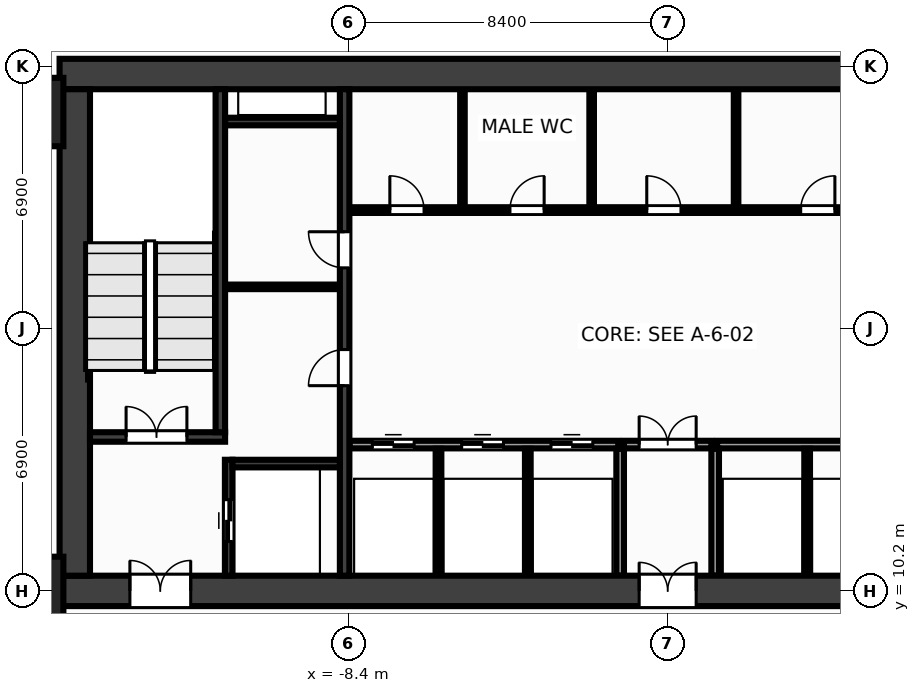
"""IFC4 building model, lengths in metres.
Left out: names, types, materials, properties, quantities, classifications, styles, units other than length and angle.
Written with IfcOpenShell. Run it as: python <this file> out.ifc"""

import sys

from ifc_helpers import new_model, si_unit, direction, frame, frame_2d, origin, origin_2d, place, context, subcontext, project, spatial, rectangle, extrude, source, transform, mapped, element, fill, save


model = new_model("IFC4")
c1 = context("Model", 3, precision=1e-05, world=origin(), true_north=direction((0.0, 1.0)))
c2 = subcontext(c1, "Body", "Model", "MODEL_VIEW")
j1 = project(units=[si_unit("LENGTHUNIT", "METRE"), si_unit("PLANEANGLEUNIT", "RADIAN")], contexts=[c1])
p1 = place(None, origin())
s1 = spatial("IfcSite", under=j1, at=p1, CompositionType="ELEMENT")
p2 = place(p1, origin())
s2 = spatial("IfcBuilding", under=s1, at=p2, CompositionType="ELEMENT")
p3 = place(p2, frame((0.0, 0.0, 9.65)))
s3 = spatial("IfcBuildingStorey", under=s2, at=p3, CompositionType="ELEMENT", Elevation=9.65)
m1 = source(origin(), c2, "Body", "SweptSolid", [
    extrude(rectangle(XDim=32.0, YDim=0.8, at=frame_2d((16.0, 0.0))), origin(), (0.0, 0.0, 1.0), 4.65),
])
p4 = place(p3, frame((-16.0, 23.8, 0.0), z_axis=(0.0, 0.0, 1.0), x_axis=(1.0, 0.0, 0.0)))
e1 = element("IfcWall", 1, at=p4, inside=s3, PredefinedType="SHEAR", context=c2, shape_type="MappedRepresentation", body=[
    mapped(m1, transform((0.0, 0.0, 0.0), x_axis=(1.0, 0.0, 0.0), y_axis=(0.0, 1.0, 0.0), z_axis=(0.0, 0.0, 1.0), scale=1.0)),
])
p5 = place(p3, frame((-16.0, 10.2, 0.0), z_axis=(0.0, 0.0, 1.0), x_axis=(1.0, 0.0, 0.0)))
e2 = element("IfcWall", 2, at=p5, inside=s3, PredefinedType="SHEAR", context=c2, shape_type="MappedRepresentation", body=[
    mapped(m1, transform((0.0, 0.0, 0.0), x_axis=(1.0, 0.0, 0.0), y_axis=(0.0, 1.0, 0.0), z_axis=(0.0, 0.0, 1.0), scale=1.0)),
])
p6 = place(p5, frame((1.85, 0.0, 0.0)))
e3 = element("IfcOpeningElement", 3, at=p6, cuts=e2, PredefinedType="OPENING", context=c2, shape_type="SweptSolid", body=[
    extrude(rectangle(XDim=1.6, YDim=2.15, at=frame_2d((0.8, 1.075))), frame((0.0, 0.412, 0.0), z_axis=(0.0, -1.0, 0.0), x_axis=(1.0, 0.0, 0.0)), (0.0, 0.0, 1.0), 0.824),
])
p7 = place(p5, frame((28.55, 0.0, 0.0)))
e4 = element("IfcOpeningElement", 4, at=p7, cuts=e2, PredefinedType="OPENING", context=c2, shape_type="SweptSolid", body=[
    extrude(rectangle(XDim=1.6, YDim=2.15, at=frame_2d((0.8, 1.075))), frame((0.0, 0.412, 0.0), z_axis=(0.0, -1.0, 0.0), x_axis=(1.0, 0.0, 0.0)), (0.0, 0.0, 1.0), 0.824),
])
p8 = place(p5, frame((15.25, 0.0, 0.0)))
e5 = element("IfcOpeningElement", 5, at=p8, cuts=e2, PredefinedType="OPENING", context=c2, shape_type="SweptSolid", body=[
    extrude(rectangle(XDim=1.5, YDim=2.2, at=frame_2d((0.75, 1.1))), frame((0.0, 0.412, 0.0), z_axis=(0.0, -1.0, 0.0), x_axis=(1.0, 0.0, 0.0)), (0.0, 0.0, 1.0), 0.824),
])
m2 = source(origin(), c2, "Body", "SweptSolid", [
    extrude(rectangle(XDim=12.8, YDim=0.8, at=frame_2d((6.4, 0.0))), origin(), (0.0, 0.0, 1.0), 4.65),
])
p9 = place(p3, frame((-15.6, 10.6, 0.0), z_axis=(0.0, 0.0, 1.0), x_axis=(0.0, 1.0, 0.0)))
e6 = element("IfcWall", 6, at=p9, inside=s3, PredefinedType="SHEAR", context=c2, shape_type="MappedRepresentation", body=[
    mapped(m2, transform((0.0, 0.0, 0.0), x_axis=(1.0, 0.0, 0.0), y_axis=(0.0, 1.0, 0.0), z_axis=(0.0, 0.0, 1.0), scale=1.0)),
])
m3 = source(origin(), c2, "Body", "SweptSolid", [
    extrude(rectangle(XDim=12.8, YDim=0.25, at=frame_2d((6.4, 0.0))), origin(), (0.0, 0.0, 1.0), 4.65),
])
p10 = place(p3, frame((-8.5, 10.6, 0.0), z_axis=(0.0, 0.0, 1.0), x_axis=(0.0, 1.0, 0.0)))
e7 = element("IfcWall", 7, at=p10, inside=s3, PredefinedType="SHEAR", context=c2, shape_type="MappedRepresentation", body=[
    mapped(m3, transform((0.0, 0.0, 0.0), x_axis=(1.0, 0.0, 0.0), y_axis=(0.0, 1.0, 0.0), z_axis=(0.0, 0.0, 1.0), scale=1.0)),
])
p11 = place(p10, frame((5.0, 0.0, 0.0)))
e8 = element("IfcOpeningElement", 8, at=p11, cuts=e7, PredefinedType="OPENING", context=c2, shape_type="SweptSolid", body=[
    extrude(rectangle(XDim=0.95, YDim=2.15, at=frame_2d((0.475, 1.075))), frame((0.0, 0.137, 0.0), z_axis=(0.0, -1.0, 0.0), x_axis=(1.0, 0.0, 0.0)), (0.0, 0.0, 1.0), 0.274),
])
p12 = place(p10, frame((8.1, 0.0, 0.0)))
e9 = element("IfcOpeningElement", 9, at=p12, cuts=e7, PredefinedType="OPENING", context=c2, shape_type="SweptSolid", body=[
    extrude(rectangle(XDim=0.95, YDim=2.15, at=frame_2d((0.475, 1.075))), frame((0.0, 0.137, 0.0), z_axis=(0.0, -1.0, 0.0), x_axis=(1.0, 0.0, 0.0)), (0.0, 0.0, 1.0), 0.274),
])
m4 = source(origin(), c2, "Body", "SweptSolid", [
    extrude(rectangle(XDim=3.555, YDim=0.25, at=frame_2d((1.777, 0.0))), origin(), (0.0, 0.0, 1.0), 4.65),
])
p13 = place(p3, frame((-15.2, 14.25, 0.0), z_axis=(0.0, 0.0, 1.0), x_axis=(1.0, 0.0, 0.0)))
e10 = element("IfcWall", 10, at=p13, inside=s3, PredefinedType="SHEAR", context=c2, shape_type="MappedRepresentation", body=[
    mapped(m4, transform((0.0, 0.0, 0.0), x_axis=(1.0, 0.0, 0.0), y_axis=(0.0, 1.0, 0.0), z_axis=(0.0, 0.0, 1.0), scale=1.0)),
])
p14 = place(p13, frame((0.95, 0.0, 0.0)))
e11 = element("IfcOpeningElement", 11, at=p14, cuts=e10, PredefinedType="OPENING", context=c2, shape_type="SweptSolid", body=[
    extrude(rectangle(XDim=1.6, YDim=2.15, at=frame_2d((0.8, 1.075))), frame((0.0, 0.137, 0.0), z_axis=(0.0, -1.0, 0.0), x_axis=(1.0, 0.0, 0.0)), (0.0, 0.0, 1.0), 0.274),
])
m5 = source(origin(), c2, "Body", "SweptSolid", [
    extrude(rectangle(XDim=9.025, YDim=0.25, at=frame_2d((4.512, 0.0))), origin(), (0.0, 0.0, 1.0), 4.65),
])
p15 = place(p3, frame((-11.77, 14.375, 0.0), z_axis=(0.0, 0.0, 1.0), x_axis=(0.0, 1.0, 0.0)))
e12 = element("IfcWall", 12, at=p15, inside=s3, PredefinedType="SHEAR", context=c2, shape_type="MappedRepresentation", body=[
    mapped(m5, transform((0.0, 0.0, 0.0), x_axis=(1.0, 0.0, 0.0), y_axis=(0.0, 1.0, 0.0), z_axis=(0.0, 0.0, 1.0), scale=1.0)),
])
m6 = source(origin(), c2, "Body", "SweptSolid", [
    extrude(rectangle(XDim=3.05, YDim=0.2, at=frame_2d((1.525, 0.0))), origin(), (0.0, 0.0, 1.0), 4.65),
])
p16 = place(p3, frame((-11.55, 10.6, 0.0), z_axis=(0.0, 0.0, 1.0), x_axis=(0.0, 1.0, 0.0)))
e13 = element("IfcWall", 13, at=p16, inside=s3, PredefinedType="SHEAR", context=c2, shape_type="MappedRepresentation", body=[
    mapped(m6, transform((0.0, 0.0, 0.0), x_axis=(1.0, 0.0, 0.0), y_axis=(0.0, 1.0, 0.0), z_axis=(0.0, 0.0, 1.0), scale=1.0)),
])
p17 = place(p16, frame((0.9, 0.0, 0.0)))
e14 = element("IfcOpeningElement", 14, at=p17, cuts=e13, PredefinedType="OPENING", context=c2, shape_type="SweptSolid", body=[
    extrude(rectangle(XDim=1.1, YDim=2.15, at=frame_2d((0.55, 1.075))), frame((0.0, 0.112, 0.0), z_axis=(0.0, -1.0, 0.0), x_axis=(1.0, 0.0, 0.0)), (0.0, 0.0, 1.0), 0.224),
])
m7 = source(origin(), c2, "Body", "SweptSolid", [
    extrude(rectangle(XDim=2.825, YDim=0.2, at=frame_2d((1.413, 0.0))), origin(), (0.0, 0.0, 1.0), 4.65),
])
p18 = place(p3, frame((-11.45, 13.55, 0.0), z_axis=(0.0, 0.0, 1.0), x_axis=(1.0, 0.0, 0.0)))
e15 = element("IfcWall", 15, at=p18, inside=s3, PredefinedType="SHEAR", context=c2, shape_type="MappedRepresentation", body=[
    mapped(m7, transform((0.0, 0.0, 0.0), x_axis=(1.0, 0.0, 0.0), y_axis=(0.0, 1.0, 0.0), z_axis=(0.0, 0.0, 1.0), scale=1.0)),
])
m8 = source(origin(), c2, "Body", "SweptSolid", [
    extrude(rectangle(XDim=3.02, YDim=0.2, at=frame_2d((1.51, 0.0))), origin(), (0.0, 0.0, 1.0), 4.65),
])
p19 = place(p3, frame((-11.645, 22.55, 0.0), z_axis=(0.0, 0.0, 1.0), x_axis=(1.0, 0.0, 0.0)))
e16 = element("IfcWall", 16, at=p19, inside=s3, PredefinedType="SHEAR", context=c2, shape_type="MappedRepresentation", body=[
    mapped(m8, transform((0.0, 0.0, 0.0), x_axis=(1.0, 0.0, 0.0), y_axis=(0.0, 1.0, 0.0), z_axis=(0.0, 0.0, 1.0), scale=1.0)),
])
m9 = source(origin(), c2, "Body", "SweptSolid", [
    extrude(rectangle(XDim=1.8, YDim=1.8, at=origin_2d()), origin(), (0.0, 0.0, 1.0), 4.65),
])
for number, where, z_axis, x_axis in (
    (17, (-16.8, 10.2, 0.0), (0.0, 0.0, 1.0), (1.0, 0.0, 0.0)),
    (18, (-16.8, 22.8, 0.0), (0.0, 0.0, 1.0), (1.0, 0.0, 0.0)),
):
    element("IfcColumn", number, at=place(p3, frame(where, z_axis=z_axis, x_axis=x_axis)), inside=s3, PredefinedType="COLUMN", context=c2, shape_type="MappedRepresentation", body=[
        mapped(m9, transform((0.0, 0.0, 0.0), x_axis=(1.0, 0.0, 0.0), y_axis=(0.0, 1.0, 0.0), z_axis=(0.0, 0.0, 1.0), scale=1.0)),
    ])
m10 = source(origin(), c2, "Body", "SweptSolid", [
    extrude(rectangle(XDim=3.01, YDim=0.12, at=frame_2d((1.505, 0.0))), origin(), (0.0, 0.0, 1.0), 4.37),
])
p20 = place(p3, frame((-11.64, 18.2, 0.0), z_axis=(0.0, 0.0, 1.0), x_axis=(1.0, 0.0, 0.0)))
e19 = element("IfcWall", 19, at=p20, inside=s3, PredefinedType="PARTITIONING", context=c2, shape_type="MappedRepresentation", body=[
    mapped(m10, transform((0.0, 0.0, 0.0), x_axis=(1.0, 0.0, 0.0), y_axis=(0.0, 1.0, 0.0), z_axis=(0.0, 0.0, 1.0), scale=1.0)),
])
m11 = source(origin(), c2, "Body", "SweptSolid", [
    extrude(rectangle(XDim=7.07, YDim=0.2, at=frame_2d((3.535, 0.0))), origin(), (0.0, 0.0, 1.0), 4.37),
])
p21 = place(p3, frame((-8.37, 14.05, 0.0), z_axis=(0.0, 0.0, 1.0), x_axis=(1.0, 0.0, 0.0)))
e20 = element("IfcWall", 20, at=p21, inside=s3, PredefinedType="PARTITIONING", context=c2, shape_type="MappedRepresentation", body=[
    mapped(m11, transform((0.0, 0.0, 0.0), x_axis=(1.0, 0.0, 0.0), y_axis=(0.0, 1.0, 0.0), z_axis=(0.0, 0.0, 1.0), scale=1.0)),
])
p22 = place(p21, frame((0.6, 0.0, 0.0)))
e21 = element("IfcOpeningElement", 21, at=p22, cuts=e20, PredefinedType="OPENING", context=c2, shape_type="SweptSolid", body=[
    extrude(rectangle(XDim=1.1, YDim=2.15, at=frame_2d((0.55, 1.075))), frame((0.0, 0.112, 0.0), z_axis=(0.0, -1.0, 0.0), x_axis=(1.0, 0.0, 0.0)), (0.0, 0.0, 1.0), 0.224),
])
p23 = place(p21, frame((2.95, 0.0, 0.0)))
e22 = element("IfcOpeningElement", 22, at=p23, cuts=e20, PredefinedType="OPENING", context=c2, shape_type="SweptSolid", body=[
    extrude(rectangle(XDim=1.1, YDim=2.15, at=frame_2d((0.55, 1.075))), frame((0.0, 0.112, 0.0), z_axis=(0.0, -1.0, 0.0), x_axis=(1.0, 0.0, 0.0)), (0.0, 0.0, 1.0), 0.224),
])
p24 = place(p21, frame((5.3, 0.0, 0.0)))
e23 = element("IfcOpeningElement", 23, at=p24, cuts=e20, PredefinedType="OPENING", context=c2, shape_type="SweptSolid", body=[
    extrude(rectangle(XDim=1.1, YDim=2.15, at=frame_2d((0.55, 1.075))), frame((0.0, 0.112, 0.0), z_axis=(0.0, -1.0, 0.0), x_axis=(1.0, 0.0, 0.0)), (0.0, 0.0, 1.0), 0.224),
])
p25 = place(p3, frame((1.3, 14.05, 0.0), z_axis=(0.0, 0.0, 1.0), x_axis=(1.0, 0.0, 0.0)))
e24 = element("IfcWall", 24, at=p25, inside=s3, PredefinedType="PARTITIONING", context=c2, shape_type="MappedRepresentation", body=[
    mapped(m11, transform((0.0, 0.0, 0.0), x_axis=(1.0, 0.0, 0.0), y_axis=(0.0, 1.0, 0.0), z_axis=(0.0, 0.0, 1.0), scale=1.0)),
])
m12 = source(origin(), c2, "Body", "SweptSolid", [
    extrude(rectangle(XDim=3.34, YDim=0.2, at=frame_2d((1.67, 0.0))), origin(), (0.0, 0.0, 1.0), 4.37),
])
for number, where, z_axis, x_axis in (
    (25, (-1.25, 10.6, 0.0), (0.0, 0.0, 1.0), (0.0, 1.0, 0.0)),
    (26, (1.25, 10.6, 0.0), (0.0, 0.0, 1.0), (0.0, 1.0, 0.0)),
):
    element("IfcWall", number, at=place(p3, frame(where, z_axis=z_axis, x_axis=x_axis)), inside=s3, PredefinedType="PARTITIONING", context=c2, shape_type="MappedRepresentation", body=[
        mapped(m12, transform((0.0, 0.0, 0.0), x_axis=(1.0, 0.0, 0.0), y_axis=(0.0, 1.0, 0.0), z_axis=(0.0, 0.0, 1.0), scale=1.0)),
    ])
m13 = source(origin(), c2, "Body", "SweptSolid", [
    extrude(rectangle(XDim=2.3, YDim=0.2, at=frame_2d((1.15, 0.0))), origin(), (0.0, 0.0, 1.0), 4.37),
])
p26 = place(p3, frame((-1.15, 14.05, 0.0), z_axis=(0.0, 0.0, 1.0), x_axis=(1.0, 0.0, 0.0)))
e27 = element("IfcWall", 27, at=p26, inside=s3, PredefinedType="PARTITIONING", context=c2, shape_type="MappedRepresentation", body=[
    mapped(m13, transform((0.0, 0.0, 0.0), x_axis=(1.0, 0.0, 0.0), y_axis=(0.0, 1.0, 0.0), z_axis=(0.0, 0.0, 1.0), scale=1.0)),
])
p27 = place(p26, frame((0.4, 0.0, 0.0)))
e28 = element("IfcOpeningElement", 28, at=p27, cuts=e27, PredefinedType="OPENING", context=c2, shape_type="SweptSolid", body=[
    extrude(rectangle(XDim=1.5, YDim=2.2, at=frame_2d((0.75, 1.1))), frame((0.0, 0.112, 0.0), z_axis=(0.0, -1.0, 0.0), x_axis=(1.0, 0.0, 0.0)), (0.0, 0.0, 1.0), 0.224),
])
m14 = source(origin(), c2, "Body", "SweptSolid", [
    extrude(rectangle(XDim=14.59, YDim=0.15, at=frame_2d((7.295, 0.0))), origin(), (0.0, 0.0, 1.0), 4.37),
])
p28 = place(p3, frame((-8.37, 20.22, 0.0), z_axis=(0.0, 0.0, 1.0), x_axis=(1.0, 0.0, 0.0)))
e29 = element("IfcWall", 29, at=p28, inside=s3, PredefinedType="PARTITIONING", context=c2, shape_type="MappedRepresentation", body=[
    mapped(m14, transform((0.0, 0.0, 0.0), x_axis=(1.0, 0.0, 0.0), y_axis=(0.0, 1.0, 0.0), z_axis=(0.0, 0.0, 1.0), scale=1.0)),
])
p29 = place(p28, frame((1.06, 0.0, 0.0)))
e30 = element("IfcOpeningElement", 30, at=p29, cuts=e29, PredefinedType="OPENING", context=c2, shape_type="SweptSolid", body=[
    extrude(rectangle(XDim=0.9, YDim=2.15, at=frame_2d((0.45, 1.075))), frame((0.0, 0.087, 0.0), z_axis=(0.0, -1.0, 0.0), x_axis=(1.0, 0.0, 0.0)), (0.0, 0.0, 1.0), 0.174),
])
p30 = place(p28, frame((4.22, 0.0, 0.0)))
e31 = element("IfcOpeningElement", 31, at=p30, cuts=e29, PredefinedType="OPENING", context=c2, shape_type="SweptSolid", body=[
    extrude(rectangle(XDim=0.9, YDim=2.15, at=frame_2d((0.45, 1.075))), frame((0.0, 0.087, 0.0), z_axis=(0.0, -1.0, 0.0), x_axis=(1.0, 0.0, 0.0)), (0.0, 0.0, 1.0), 0.174),
])
p31 = place(p28, frame((7.82, 0.0, 0.0)))
e32 = element("IfcOpeningElement", 32, at=p31, cuts=e29, PredefinedType="OPENING", context=c2, shape_type="SweptSolid", body=[
    extrude(rectangle(XDim=0.9, YDim=2.15, at=frame_2d((0.45, 1.075))), frame((0.0, 0.087, 0.0), z_axis=(0.0, -1.0, 0.0), x_axis=(1.0, 0.0, 0.0)), (0.0, 0.0, 1.0), 0.174),
])
p32 = place(p28, frame((11.87, 0.0, 0.0)))
e33 = element("IfcOpeningElement", 33, at=p32, cuts=e29, PredefinedType="OPENING", context=c2, shape_type="SweptSolid", body=[
    extrude(rectangle(XDim=0.9, YDim=2.15, at=frame_2d((0.45, 1.075))), frame((0.0, 0.087, 0.0), z_axis=(0.0, -1.0, 0.0), x_axis=(1.0, 0.0, 0.0)), (0.0, 0.0, 1.0), 0.174),
])
m15 = source(origin(), c2, "Body", "SweptSolid", [
    extrude(rectangle(XDim=3.34, YDim=0.15, at=frame_2d((1.67, 0.0))), origin(), (0.0, 0.0, 1.0), 4.37),
])
for number, where, z_axis, x_axis in (
    (34, (-6.03, 10.6, 0.0), (0.0, 0.0, 1.0), (0.0, 1.0, 0.0)),
    (35, (-3.68, 10.6, 0.0), (0.0, 0.0, 1.0), (0.0, 1.0, 0.0)),
    (36, (3.67, 10.6, 0.0), (0.0, 0.0, 1.0), (0.0, 1.0, 0.0)),
):
    element("IfcWall", number, at=place(p3, frame(where, z_axis=z_axis, x_axis=x_axis)), inside=s3, PredefinedType="PARTITIONING", context=c2, shape_type="MappedRepresentation", body=[
        mapped(m15, transform((0.0, 0.0, 0.0), x_axis=(1.0, 0.0, 0.0), y_axis=(0.0, 1.0, 0.0), z_axis=(0.0, 0.0, 1.0), scale=1.0)),
    ])
m16 = source(origin(), c2, "Body", "SweptSolid", [
    extrude(rectangle(XDim=3.04, YDim=0.12, at=frame_2d((1.52, 0.0))), origin(), (0.0, 0.0, 1.0), 4.37),
])
for number, where, z_axis, x_axis in (
    (37, (-5.4, 20.32, 0.0), (0.0, 0.0, 1.0), (0.0, 1.0, 0.0)),
    (38, (-2.0, 20.32, 0.0), (0.0, 0.0, 1.0), (0.0, 1.0, 0.0)),
    (39, (1.8, 20.32, 0.0), (0.0, 0.0, 1.0), (0.0, 1.0, 0.0)),
):
    element("IfcWall", number, at=place(p3, frame(where, z_axis=z_axis, x_axis=x_axis)), inside=s3, PredefinedType="PARTITIONING", context=c2, shape_type="MappedRepresentation", body=[
        mapped(m16, transform((0.0, 0.0, 0.0), x_axis=(1.0, 0.0, 0.0), y_axis=(0.0, 1.0, 0.0), z_axis=(0.0, 0.0, 1.0), scale=1.0)),
    ])
m17 = source(origin(), c2, "Body", "SweptSolid", [
    extrude(rectangle(XDim=1.6, YDim=2.15, at=frame_2d((0.8, 1.075))), frame((0.0, 0.025, 0.0), z_axis=(0.0, -1.0, 0.0), x_axis=(1.0, 0.0, 0.0)), (0.0, 0.0, 1.0), 0.05),
])
p33 = place(p14, origin())
e40 = element("IfcDoor", 40, at=p33, inside=s3, OperationType="DOUBLE_DOOR_SINGLE_SWING", PredefinedType="DOOR", context=c2, shape_type="MappedRepresentation", body=[
    mapped(m17, transform((0.0, 0.0, 0.0), x_axis=(1.0, 0.0, 0.0), y_axis=(0.0, 1.0, 0.0), z_axis=(0.0, 0.0, 1.0), scale=1.0)),
])
fill(e11, e40)
p34 = place(p6, origin())
e41 = element("IfcDoor", 41, at=p34, inside=s3, OperationType="DOUBLE_DOOR_SINGLE_SWING", PredefinedType="DOOR", context=c2, shape_type="MappedRepresentation", body=[
    mapped(m17, transform((0.0, 0.0, 0.0), x_axis=(1.0, 0.0, 0.0), y_axis=(0.0, 1.0, 0.0), z_axis=(0.0, 0.0, 1.0), scale=1.0)),
])
fill(e3, e41)
m18 = source(origin(), c2, "Body", "SweptSolid", [
    extrude(rectangle(XDim=1.1, YDim=2.15, at=frame_2d((0.55, 1.075))), frame((0.0, 0.025, 0.0), z_axis=(0.0, -1.0, 0.0), x_axis=(1.0, 0.0, 0.0)), (0.0, 0.0, 1.0), 0.05),
])
p35 = place(p17, origin())
e42 = element("IfcDoor", 42, at=p35, inside=s3, OperationType="DOUBLE_DOOR_SLIDING", PredefinedType="DOOR", context=c2, shape_type="MappedRepresentation", body=[
    mapped(m18, transform((0.0, 0.0, 0.0), x_axis=(1.0, 0.0, 0.0), y_axis=(0.0, 1.0, 0.0), z_axis=(0.0, 0.0, 1.0), scale=1.0)),
])
fill(e14, e42)
m19 = source(origin(), c2, "Body", "SweptSolid", [
    extrude(rectangle(XDim=0.95, YDim=2.15, at=frame_2d((0.475, 1.075))), frame((0.0, 0.025, 0.0), z_axis=(0.0, -1.0, 0.0), x_axis=(1.0, 0.0, 0.0)), (0.0, 0.0, 1.0), 0.05),
])
p36 = place(p11, origin())
e43 = element("IfcDoor", 43, at=p36, inside=s3, OperationType="SINGLE_SWING_LEFT", PredefinedType="DOOR", context=c2, shape_type="MappedRepresentation", body=[
    mapped(m19, transform((0.0, 0.0, 0.0), x_axis=(1.0, 0.0, 0.0), y_axis=(0.0, 1.0, 0.0), z_axis=(0.0, 0.0, 1.0), scale=1.0)),
])
fill(e8, e43)
p37 = place(p12, origin())
e44 = element("IfcDoor", 44, at=p37, inside=s3, OperationType="SINGLE_SWING_RIGHT", PredefinedType="DOOR", context=c2, shape_type="MappedRepresentation", body=[
    mapped(m19, transform((0.0, 0.0, 0.0), x_axis=(1.0, 0.0, 0.0), y_axis=(0.0, 1.0, 0.0), z_axis=(0.0, 0.0, 1.0), scale=1.0)),
])
fill(e9, e44)
p38 = place(p22, origin())
e45 = element("IfcDoor", 45, at=p38, inside=s3, OperationType="DOUBLE_DOOR_SLIDING", PredefinedType="DOOR", context=c2, shape_type="MappedRepresentation", body=[
    mapped(m18, transform((0.0, 0.0, 0.0), x_axis=(1.0, 0.0, 0.0), y_axis=(0.0, 1.0, 0.0), z_axis=(0.0, 0.0, 1.0), scale=1.0)),
])
fill(e21, e45)
p39 = place(p23, origin())
e46 = element("IfcDoor", 46, at=p39, inside=s3, OperationType="DOUBLE_DOOR_SLIDING", PredefinedType="DOOR", context=c2, shape_type="MappedRepresentation", body=[
    mapped(m18, transform((0.0, 0.0, 0.0), x_axis=(1.0, 0.0, 0.0), y_axis=(0.0, 1.0, 0.0), z_axis=(0.0, 0.0, 1.0), scale=1.0)),
])
fill(e22, e46)
p40 = place(p24, origin())
e47 = element("IfcDoor", 47, at=p40, inside=s3, OperationType="DOUBLE_DOOR_SLIDING", PredefinedType="DOOR", context=c2, shape_type="MappedRepresentation", body=[
    mapped(m18, transform((0.0, 0.0, 0.0), x_axis=(1.0, 0.0, 0.0), y_axis=(0.0, 1.0, 0.0), z_axis=(0.0, 0.0, 1.0), scale=1.0)),
])
fill(e23, e47)
m20 = source(origin(), c2, "Body", "SweptSolid", [
    extrude(rectangle(XDim=1.5, YDim=2.2, at=frame_2d((0.75, 1.1))), frame((0.0, 0.025, 0.0), z_axis=(0.0, -1.0, 0.0), x_axis=(1.0, 0.0, 0.0)), (0.0, 0.0, 1.0), 0.05),
])
p41 = place(p27, origin())
e48 = element("IfcDoor", 48, at=p41, inside=s3, OperationType="DOUBLE_DOOR_SINGLE_SWING", PredefinedType="DOOR", context=c2, shape_type="MappedRepresentation", body=[
    mapped(m20, transform((0.0, 0.0, 0.0), x_axis=(1.0, 0.0, 0.0), y_axis=(0.0, 1.0, 0.0), z_axis=(0.0, 0.0, 1.0), scale=1.0)),
])
fill(e28, e48)
p42 = place(p8, origin())
e49 = element("IfcDoor", 49, at=p42, inside=s3, OperationType="DOUBLE_DOOR_SINGLE_SWING", PredefinedType="DOOR", context=c2, shape_type="MappedRepresentation", body=[
    mapped(m20, transform((0.0, 0.0, 0.0), x_axis=(1.0, 0.0, 0.0), y_axis=(0.0, 1.0, 0.0), z_axis=(0.0, 0.0, 1.0), scale=1.0)),
])
fill(e5, e49)
m21 = source(origin(), c2, "Body", "SweptSolid", [
    extrude(rectangle(XDim=0.9, YDim=2.15, at=frame_2d((0.45, 1.075))), frame((0.0, 0.025, 0.0), z_axis=(0.0, -1.0, 0.0), x_axis=(1.0, 0.0, 0.0)), (0.0, 0.0, 1.0), 0.05),
])
p43 = place(p29, origin())
e50 = element("IfcDoor", 50, at=p43, inside=s3, OperationType="SINGLE_SWING_LEFT", PredefinedType="DOOR", context=c2, shape_type="MappedRepresentation", body=[
    mapped(m21, transform((0.0, 0.0, 0.0), x_axis=(1.0, 0.0, 0.0), y_axis=(0.0, 1.0, 0.0), z_axis=(0.0, 0.0, 1.0), scale=1.0)),
])
fill(e30, e50)
p44 = place(p30, origin())
e51 = element("IfcDoor", 51, at=p44, inside=s3, OperationType="SINGLE_SWING_RIGHT", PredefinedType="DOOR", context=c2, shape_type="MappedRepresentation", body=[
    mapped(m21, transform((0.0, 0.0, 0.0), x_axis=(1.0, 0.0, 0.0), y_axis=(0.0, 1.0, 0.0), z_axis=(0.0, 0.0, 1.0), scale=1.0)),
])
fill(e31, e51)
p45 = place(p31, origin())
e52 = element("IfcDoor", 52, at=p45, inside=s3, OperationType="SINGLE_SWING_LEFT", PredefinedType="DOOR", context=c2, shape_type="MappedRepresentation", body=[
    mapped(m21, transform((0.0, 0.0, 0.0), x_axis=(1.0, 0.0, 0.0), y_axis=(0.0, 1.0, 0.0), z_axis=(0.0, 0.0, 1.0), scale=1.0)),
])
fill(e32, e52)
p46 = place(p32, origin())
e53 = element("IfcDoor", 53, at=p46, inside=s3, OperationType="SINGLE_SWING_RIGHT", PredefinedType="DOOR", context=c2, shape_type="MappedRepresentation", body=[
    mapped(m21, transform((0.0, 0.0, 0.0), x_axis=(1.0, 0.0, 0.0), y_axis=(0.0, 1.0, 0.0), z_axis=(0.0, 0.0, 1.0), scale=1.0)),
])
fill(e33, e53)
save(model, sys.argv[1])
